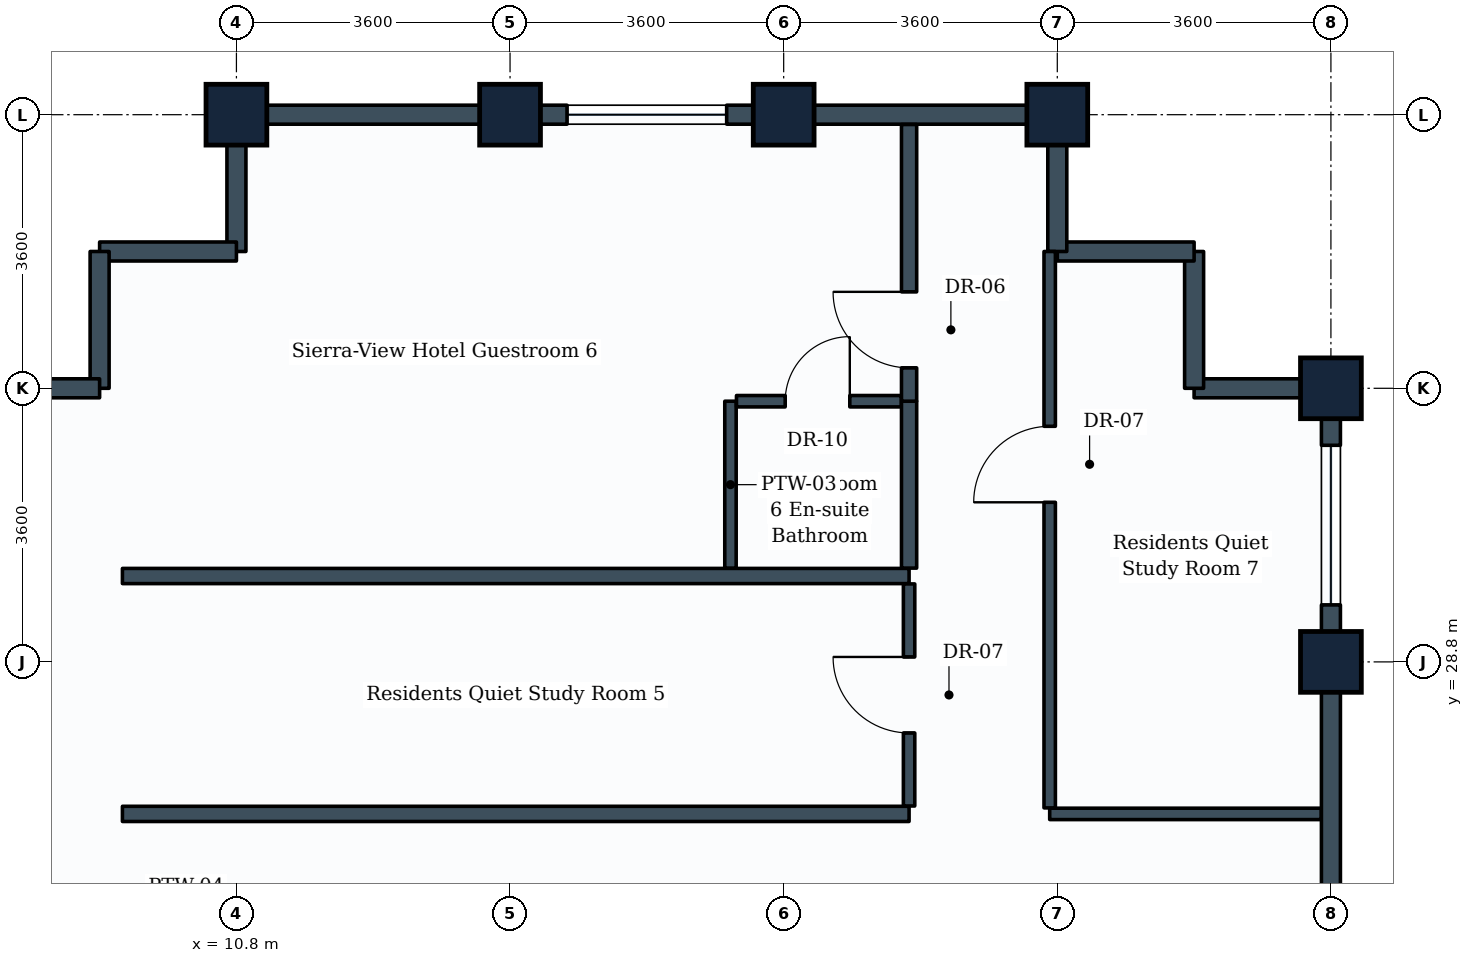
"""IFC4 building model, lengths in metres.
Left out: names, types, materials, properties, quantities, classifications, styles, units other than length and angle.
Written with IfcOpenShell. Run it as: python <this file> out.ifc"""

import sys

from ifc_helpers import new_model, si_unit, direction, frame, frame_2d, origin, origin_2d, place, context, subcontext, project, spatial, rectangle, extrude, element, fill, save


model = new_model("IFC4")
c1 = context("Model", 3, precision=1e-05, world=origin(), true_north=direction((0.0, 1.0)))
c2 = subcontext(c1, "Body", "Model", "MODEL_VIEW")
j1 = project(units=[si_unit("LENGTHUNIT", "METRE"), si_unit("PLANEANGLEUNIT", "RADIAN")], contexts=[c1])
p1 = place(None, origin())
s1 = spatial("IfcSite", under=j1, at=p1, CompositionType="ELEMENT")
p2 = place(p1, origin())
s2 = spatial("IfcBuilding", under=s1, at=p2, CompositionType="ELEMENT")
p3 = place(p2, frame((0.0, 0.0, 224.6)))
s3 = spatial("IfcBuildingStorey", under=s2, at=p3, CompositionType="ELEMENT", Elevation=224.6)
for number, where, z_axis, x_axis in (
    (1, (10.8, 36.0, 0.0), (0.0, 0.0, 1.0), (1.0, 0.0, 0.0)),
    (2, (14.4, 36.0, 0.0), (0.0, 0.0, 1.0), (1.0, 0.0, 0.0)),
    (3, (18.0, 36.0, 0.0), (0.0, 0.0, 1.0), (1.0, 0.0, 0.0)),
    (4, (21.6, 36.0, 0.0), (0.0, 0.0, 1.0), (1.0, 0.0, 0.0)),
    (5, (25.2, 28.8, 0.0), (0.0, 0.0, 1.0), (0.0, 1.0, 0.0)),
    (6, (25.2, 32.4, 0.0), (0.0, 0.0, 1.0), (0.0, 1.0, 0.0)),
):
    element("IfcColumn", number, at=place(p3, frame(where, z_axis=z_axis, x_axis=x_axis)), inside=s3, PredefinedType="COLUMN", context=c2, shape_type="SweptSolid", body=[
        extrude(rectangle(XDim=0.8, YDim=0.8, at=origin_2d()), origin(), (0.0, 0.0, 1.0), 3.6),
    ])
p4 = place(p3, frame((25.2, 28.8, 0.0), z_axis=(0.0, 0.0, 1.0), x_axis=(0.0, -1.0, 0.0)))
e7 = element("IfcWall", 7, at=p4, inside=s3, PredefinedType="STANDARD", context=c2, shape_type="SweptSolid", body=[
    extrude(rectangle(XDim=3.6, YDim=0.25, at=frame_2d((1.8, 0.0))), origin(), (0.0, 0.0, 1.0), 2.83),
])
p5 = place(p3, frame((25.2, 32.4, 0.0), z_axis=(0.0, 0.0, 1.0), x_axis=(0.0, -1.0, 0.0)))
e8 = element("IfcWall", 8, at=p5, inside=s3, PredefinedType="STANDARD", context=c2, shape_type="SweptSolid", body=[
    extrude(rectangle(XDim=3.6, YDim=0.25, at=frame_2d((1.8, 0.0))), origin(), (0.0, 0.0, 1.0), 2.83),
])
p6 = place(p5, frame((0.75, 0.0, 0.85)))
e9 = element("IfcOpeningElement", 9, at=p6, cuts=e8, PredefinedType="OPENING", context=c2, shape_type="SweptSolid", body=[
    extrude(rectangle(XDim=2.1, YDim=1.35, at=frame_2d((1.05, 0.675))), frame((0.0, 0.135, 0.0), z_axis=(0.0, -1.0, 0.0), x_axis=(1.0, 0.0, 0.0)), (0.0, 0.0, 1.0), 0.27),
])
p7 = place(p3, frame((23.4, 32.4, 0.0), z_axis=(0.0, 0.0, 1.0), x_axis=(1.0, 0.0, 0.0)))
e10 = element("IfcWall", 10, at=p7, inside=s3, PredefinedType="STANDARD", context=c2, shape_type="SweptSolid", body=[
    extrude(rectangle(XDim=1.8, YDim=0.25, at=frame_2d((0.9, 0.0))), origin(), (0.0, 0.0, 1.0), 2.83),
])
p8 = place(p3, frame((23.4, 32.4, 0.0), z_axis=(0.0, 0.0, 1.0), x_axis=(0.0, 1.0, 0.0)))
e11 = element("IfcWall", 11, at=p8, inside=s3, PredefinedType="STANDARD", context=c2, shape_type="SweptSolid", body=[
    extrude(rectangle(XDim=1.8, YDim=0.25, at=frame_2d((0.9, 0.0))), origin(), (0.0, 0.0, 1.0), 3.335),
])
p9 = place(p3, frame((21.6, 34.2, 0.0), z_axis=(0.0, 0.0, 1.0), x_axis=(1.0, 0.0, 0.0)))
e12 = element("IfcWall", 12, at=p9, inside=s3, PredefinedType="STANDARD", context=c2, shape_type="SweptSolid", body=[
    extrude(rectangle(XDim=1.8, YDim=0.25, at=frame_2d((0.9, 0.0))), origin(), (0.0, 0.0, 1.0), 3.335),
])
p10 = place(p3, frame((21.6, 34.2, 0.0), z_axis=(0.0, 0.0, 1.0), x_axis=(0.0, 1.0, 0.0)))
e13 = element("IfcWall", 13, at=p10, inside=s3, PredefinedType="STANDARD", context=c2, shape_type="SweptSolid", body=[
    extrude(rectangle(XDim=1.8, YDim=0.25, at=frame_2d((0.9, 0.0))), origin(), (0.0, 0.0, 1.0), 2.83),
])
p11 = place(p3, frame((18.0, 36.0, 0.0), z_axis=(0.0, 0.0, 1.0), x_axis=(1.0, 0.0, 0.0)))
e14 = element("IfcWall", 14, at=p11, inside=s3, PredefinedType="STANDARD", context=c2, shape_type="SweptSolid", body=[
    extrude(rectangle(XDim=3.6, YDim=0.25, at=frame_2d((1.8, 0.0))), origin(), (0.0, 0.0, 1.0), 2.83),
])
p12 = place(p3, frame((14.4, 36.0, 0.0), z_axis=(0.0, 0.0, 1.0), x_axis=(1.0, 0.0, 0.0)))
e15 = element("IfcWall", 15, at=p12, inside=s3, PredefinedType="STANDARD", context=c2, shape_type="SweptSolid", body=[
    extrude(rectangle(XDim=3.6, YDim=0.25, at=frame_2d((1.8, 0.0))), origin(), (0.0, 0.0, 1.0), 2.83),
])
p13 = place(p12, frame((0.75, 0.0, 0.85)))
e16 = element("IfcOpeningElement", 16, at=p13, cuts=e15, PredefinedType="OPENING", context=c2, shape_type="SweptSolid", body=[
    extrude(rectangle(XDim=2.1, YDim=1.35, at=frame_2d((1.05, 0.675))), frame((0.0, 0.135, 0.0), z_axis=(0.0, -1.0, 0.0), x_axis=(1.0, 0.0, 0.0)), (0.0, 0.0, 1.0), 0.27),
])
p14 = place(p3, frame((10.8, 36.0, 0.0), z_axis=(0.0, 0.0, 1.0), x_axis=(1.0, 0.0, 0.0)))
e17 = element("IfcWall", 17, at=p14, inside=s3, PredefinedType="STANDARD", context=c2, shape_type="SweptSolid", body=[
    extrude(rectangle(XDim=3.6, YDim=0.25, at=frame_2d((1.8, 0.0))), origin(), (0.0, 0.0, 1.0), 2.83),
])
p15 = place(p3, frame((10.8, 34.2, 0.0), z_axis=(0.0, 0.0, 1.0), x_axis=(0.0, 1.0, 0.0)))
e18 = element("IfcWall", 18, at=p15, inside=s3, PredefinedType="STANDARD", context=c2, shape_type="SweptSolid", body=[
    extrude(rectangle(XDim=1.8, YDim=0.25, at=frame_2d((0.9, 0.0))), origin(), (0.0, 0.0, 1.0), 2.83),
])
for number, where, z_axis, x_axis in (
    (19, (9.0, 34.2, 0.0), (0.0, 0.0, 1.0), (1.0, 0.0, 0.0)),
    (20, (9.0, 32.4, 0.0), (0.0, 0.0, 1.0), (0.0, 1.0, 0.0)),
):
    element("IfcWall", number, at=place(p3, frame(where, z_axis=z_axis, x_axis=x_axis)), inside=s3, PredefinedType="STANDARD", context=c2, shape_type="SweptSolid", body=[
        extrude(rectangle(XDim=1.8, YDim=0.25, at=frame_2d((0.9, 0.0))), origin(), (0.0, 0.0, 1.0), 3.335),
    ])
p16 = place(p3, frame((7.2, 32.4, 0.0), z_axis=(0.0, 0.0, 1.0), x_axis=(1.0, 0.0, 0.0)))
e21 = element("IfcWall", 21, at=p16, inside=s3, PredefinedType="STANDARD", context=c2, shape_type="SweptSolid", body=[
    extrude(rectangle(XDim=1.8, YDim=0.25, at=frame_2d((0.9, 0.0))), origin(), (0.0, 0.0, 1.0), 2.83),
])
for number, where, z_axis, x_axis in (
    (22, (9.3, 26.8, 0.0), (0.0, 0.0, 1.0), (1.0, 0.0, 0.0)),
    (23, (9.3, 29.93, 0.0), (0.0, 0.0, 1.0), (1.0, 0.0, 0.0)),
):
    element("IfcWall", number, at=place(p3, frame(where, z_axis=z_axis, x_axis=x_axis)), inside=s3, PredefinedType="PARTITIONING", context=c2, shape_type="SweptSolid", body=[
        extrude(rectangle(XDim=10.35, YDim=0.2, at=frame_2d((5.175, 0.0))), origin(), (0.0, 0.0, 1.0), 3.03),
    ])
p17 = place(p3, frame((19.65, 26.904, 0.0), z_axis=(0.0, 0.0, 1.0), x_axis=(0.0, 1.0, 0.0)))
e24 = element("IfcWall", 24, at=p17, inside=s3, PredefinedType="PARTITIONING", context=c2, shape_type="SweptSolid", body=[
    extrude(rectangle(XDim=2.922, YDim=0.15, at=frame_2d((1.461, 0.0))), origin(), (0.0, 0.0, 1.0), 3.03),
])
p18 = place(p17, frame((0.961, 0.0, 0.0)))
e25 = element("IfcOpeningElement", 25, at=p18, cuts=e24, PredefinedType="OPENING", context=c2, shape_type="SweptSolid", body=[
    extrude(rectangle(XDim=1.0, YDim=2.1, at=frame_2d((0.5, 1.05))), frame((0.0, 0.085, 0.0), z_axis=(0.0, -1.0, 0.0), x_axis=(1.0, 0.0, 0.0)), (0.0, 0.0, 1.0), 0.17),
])
p19 = place(p3, frame((19.65, 30.034, 0.0), z_axis=(0.0, 0.0, 1.0), x_axis=(0.0, 1.0, 0.0)))
e26 = element("IfcWall", 26, at=p19, inside=s3, PredefinedType="PARTITIONING", context=c2, shape_type="SweptSolid", body=[
    extrude(rectangle(XDim=2.196, YDim=0.2, at=frame_2d((1.098, 0.0))), origin(), (0.0, 0.0, 1.0), 3.335),
])
p20 = place(p3, frame((19.65, 32.23, 0.0), z_axis=(0.0, 0.0, 1.0), x_axis=(0.0, 1.0, 0.0)))
e27 = element("IfcWall", 27, at=p20, inside=s3, PredefinedType="PARTITIONING", context=c2, shape_type="SweptSolid", body=[
    extrude(rectangle(XDim=3.641, YDim=0.2, at=frame_2d((1.821, 0.0))), origin(), (0.0, 0.0, 1.0), 2.83),
])
p21 = place(p20, frame((0.439, 0.0, 0.0)))
e28 = element("IfcOpeningElement", 28, at=p21, cuts=e27, PredefinedType="OPENING", context=c2, shape_type="SweptSolid", body=[
    extrude(rectangle(XDim=1.0, YDim=2.1, at=frame_2d((0.5, 1.05))), frame((0.0, 0.11, 0.0), z_axis=(0.0, -1.0, 0.0), x_axis=(1.0, 0.0, 0.0)), (0.0, 0.0, 1.0), 0.22),
])
p22 = place(p3, frame((17.3, 30.034, 0.0), z_axis=(0.0, 0.0, 1.0), x_axis=(0.0, 1.0, 0.0)))
e29 = element("IfcWall", 29, at=p22, inside=s3, PredefinedType="PARTITIONING", context=c2, shape_type="SweptSolid", body=[
    extrude(rectangle(XDim=2.196, YDim=0.15, at=frame_2d((1.098, 0.0))), origin(), (0.0, 0.0, 1.0), 3.335),
])
p23 = place(p3, frame((17.379, 32.23, 0.0), z_axis=(0.0, 0.0, 1.0), x_axis=(1.0, 0.0, 0.0)))
e30 = element("IfcWall", 30, at=p23, inside=s3, PredefinedType="PARTITIONING", context=c2, shape_type="SweptSolid", body=[
    extrude(rectangle(XDim=2.167, YDim=0.15, at=frame_2d((1.083, 0.0))), origin(), (0.0, 0.0, 1.0), 3.03),
])
p24 = place(p23, frame((0.641, 0.0, 0.0)))
e31 = element("IfcOpeningElement", 31, at=p24, cuts=e30, PredefinedType="OPENING", context=c2, shape_type="SweptSolid", body=[
    extrude(rectangle(XDim=0.85, YDim=2.1, at=frame_2d((0.425, 1.05))), frame((0.0, 0.085, 0.0), z_axis=(0.0, -1.0, 0.0), x_axis=(1.0, 0.0, 0.0)), (0.0, 0.0, 1.0), 0.17),
])
p25 = place(p3, frame((21.5, 26.8, 0.0), z_axis=(0.0, 0.0, 1.0), x_axis=(1.0, 0.0, 0.0)))
e32 = element("IfcWall", 32, at=p25, inside=s3, PredefinedType="PARTITIONING", context=c2, shape_type="SweptSolid", body=[
    extrude(rectangle(XDim=3.571, YDim=0.15, at=frame_2d((1.786, 0.0))), origin(), (0.0, 0.0, 1.0), 2.83),
])
p26 = place(p3, frame((21.5, 26.879, 0.0), z_axis=(0.0, 0.0, 1.0), x_axis=(0.0, 1.0, 0.0)))
e33 = element("IfcWall", 33, at=p26, inside=s3, PredefinedType="PARTITIONING", context=c2, shape_type="SweptSolid", body=[
    extrude(rectangle(XDim=7.321, YDim=0.15, at=frame_2d((3.661, 0.0))), origin(), (0.0, 0.0, 1.0), 3.03),
])
p27 = place(p26, frame((4.021, 0.0, 0.0)))
e34 = element("IfcOpeningElement", 34, at=p27, cuts=e33, PredefinedType="OPENING", context=c2, shape_type="SweptSolid", body=[
    extrude(rectangle(XDim=1.0, YDim=2.1, at=frame_2d((0.5, 1.05))), frame((0.0, 0.085, 0.0), z_axis=(0.0, -1.0, 0.0), x_axis=(1.0, 0.0, 0.0)), (0.0, 0.0, 1.0), 0.17),
])
p28 = place(p6, origin())
e35 = element("IfcWindow", 35, at=p28, inside=s3, PartitioningType="SINGLE_PANEL", PredefinedType="WINDOW", context=c2, shape_type="SweptSolid", body=[
    extrude(rectangle(XDim=2.1, YDim=1.35, at=frame_2d((1.05, 0.675))), frame((0.0, 0.03, 0.0), z_axis=(0.0, -1.0, 0.0), x_axis=(1.0, 0.0, 0.0)), (0.0, 0.0, 1.0), 0.06),
])
fill(e9, e35)
p29 = place(p13, origin())
e36 = element("IfcWindow", 36, at=p29, inside=s3, PartitioningType="SINGLE_PANEL", PredefinedType="WINDOW", context=c2, shape_type="SweptSolid", body=[
    extrude(rectangle(XDim=2.1, YDim=1.35, at=frame_2d((1.05, 0.675))), frame((0.0, 0.03, 0.0), z_axis=(0.0, -1.0, 0.0), x_axis=(1.0, 0.0, 0.0)), (0.0, 0.0, 1.0), 0.06),
])
fill(e16, e36)
p30 = place(p18, origin())
e37 = element("IfcDoor", 37, at=p30, inside=s3, OperationType="SINGLE_SWING_RIGHT", PredefinedType="DOOR", context=c2, shape_type="SweptSolid", body=[
    extrude(rectangle(XDim=1.0, YDim=2.1, at=frame_2d((0.5, 1.05))), frame((0.0, 0.025, 0.0), z_axis=(0.0, -1.0, 0.0), x_axis=(1.0, 0.0, 0.0)), (0.0, 0.0, 1.0), 0.05),
])
fill(e25, e37)
p31 = place(p21, origin())
e38 = element("IfcDoor", 38, at=p31, inside=s3, OperationType="SINGLE_SWING_RIGHT", PredefinedType="DOOR", context=c2, shape_type="SweptSolid", body=[
    extrude(rectangle(XDim=1.0, YDim=2.1, at=frame_2d((0.5, 1.05))), frame((0.0, 0.025, 0.0), z_axis=(0.0, -1.0, 0.0), x_axis=(1.0, 0.0, 0.0)), (0.0, 0.0, 1.0), 0.05),
])
fill(e28, e38)
p32 = place(p24, origin())
e39 = element("IfcDoor", 39, at=p32, inside=s3, OperationType="SINGLE_SWING_RIGHT", PredefinedType="DOOR", context=c2, shape_type="SweptSolid", body=[
    extrude(rectangle(XDim=0.85, YDim=2.1, at=frame_2d((0.425, 1.05))), frame((0.0, 0.025, 0.0), z_axis=(0.0, -1.0, 0.0), x_axis=(1.0, 0.0, 0.0)), (0.0, 0.0, 1.0), 0.05),
])
fill(e31, e39)
p33 = place(p27, origin())
e40 = element("IfcDoor", 40, at=p33, inside=s3, OperationType="SINGLE_SWING_LEFT", PredefinedType="DOOR", context=c2, shape_type="SweptSolid", body=[
    extrude(rectangle(XDim=1.0, YDim=2.1, at=frame_2d((0.5, 1.05))), frame((0.0, 0.025, 0.0), z_axis=(0.0, -1.0, 0.0), x_axis=(1.0, 0.0, 0.0)), (0.0, 0.0, 1.0), 0.05),
])
fill(e34, e40)
save(model, sys.argv[1])
